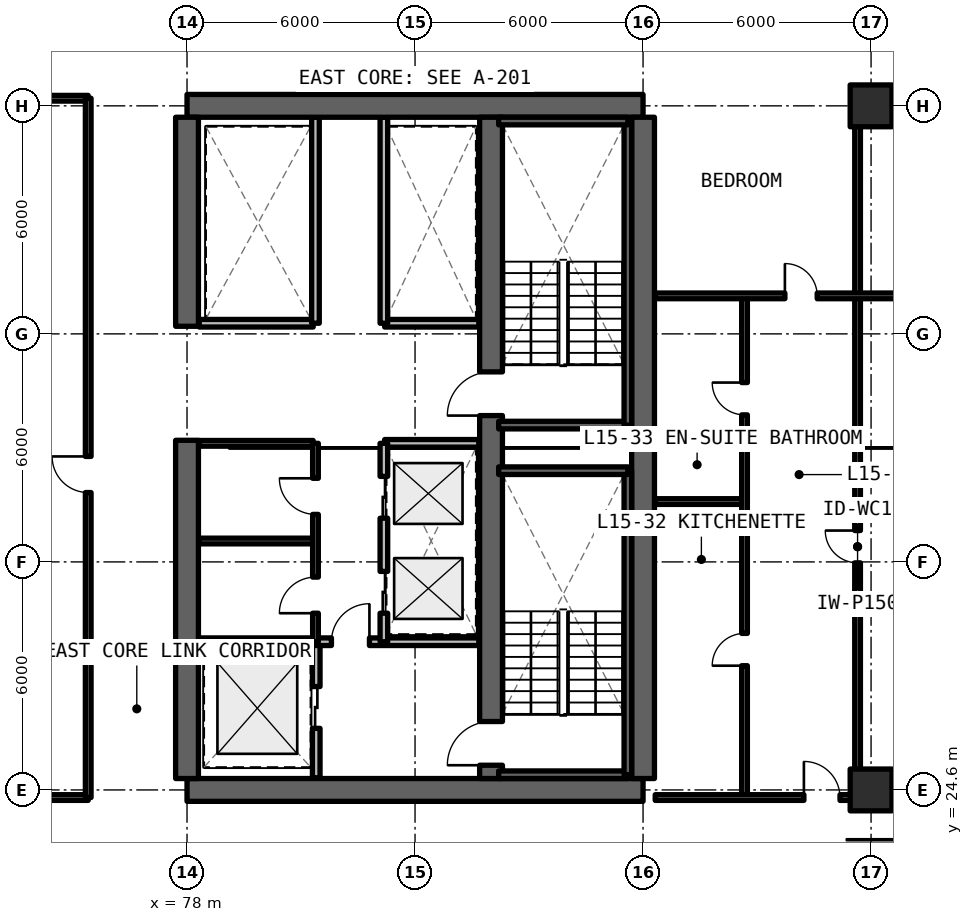
"""IFC4 building model, lengths in metres.
Left out: names, types, materials, properties, quantities, classifications, styles, units other than length and angle.
Written with IfcOpenShell. Run it as: python <this file> out.ifc"""

import sys

from ifc_helpers import new_model, si_unit, direction, frame, frame_2d, origin, origin_2d, place, context, subcontext, project, spatial, rectangle, extrude, element, fill, save


model = new_model("IFC4")
c1 = context("Model", 3, precision=1e-05, world=origin(), true_north=direction((0.0, 1.0)))
c2 = subcontext(c1, "Body", "Model", "MODEL_VIEW")
j1 = project(units=[si_unit("LENGTHUNIT", "METRE"), si_unit("PLANEANGLEUNIT", "RADIAN")], contexts=[c1])
p1 = place(None, origin())
s1 = spatial("IfcSite", under=j1, at=p1, CompositionType="ELEMENT")
p2 = place(p1, origin())
s2 = spatial("IfcBuilding", under=s1, at=p2, CompositionType="ELEMENT")
p3 = place(p2, frame((0.0, 0.0, 55.44)))
s3 = spatial("IfcBuildingStorey", under=s2, at=p3, CompositionType="ELEMENT", Elevation=55.44)
for number, where, z_axis, x_axis in (
    (1, (78.0, 24.6, 0.0), (0.0, 0.0, 1.0), (1.0, 0.0, 0.0)),
    (2, (90.0, 42.6, 0.0), (0.0, 0.0, 1.0), (-1.0, 0.0, 0.0)),
):
    element("IfcWall", number, at=place(p3, frame(where, z_axis=z_axis, x_axis=x_axis)), inside=s3, PredefinedType="SHEAR", context=c2, shape_type="SweptSolid", body=[
        extrude(rectangle(XDim=12.0, YDim=0.6, at=frame_2d((6.0, 0.0))), origin(), (0.0, 0.0, 1.0), 3.3),
    ])
p4 = place(p3, frame((90.0, 24.9, 0.0), z_axis=(0.0, 0.0, 1.0), x_axis=(0.0, 1.0, 0.0)))
e3 = element("IfcWall", 3, at=p4, inside=s3, PredefinedType="SHEAR", context=c2, shape_type="SweptSolid", body=[
    extrude(rectangle(XDim=17.4, YDim=0.6, at=frame_2d((8.7, 0.0))), origin(), (0.0, 0.0, 1.0), 3.3),
])
p5 = place(p3, frame((78.0, 24.9, 0.0), z_axis=(0.0, 0.0, 1.0), x_axis=(0.0, 1.0, 0.0)))
e4 = element("IfcWall", 4, at=p5, inside=s3, PredefinedType="SHEAR", context=c2, shape_type="SweptSolid", body=[
    extrude(rectangle(XDim=8.9, YDim=0.6, at=frame_2d((4.45, 0.0))), origin(), (0.0, 0.0, 1.0), 3.3),
])
p6 = place(p3, frame((78.0, 36.8, 0.0), z_axis=(0.0, 0.0, 1.0), x_axis=(0.0, 1.0, 0.0)))
e5 = element("IfcWall", 5, at=p6, inside=s3, PredefinedType="SHEAR", context=c2, shape_type="SweptSolid", body=[
    extrude(rectangle(XDim=5.5, YDim=0.6, at=frame_2d((2.75, 0.0))), origin(), (0.0, 0.0, 1.0), 3.3),
])
p7 = place(p3, frame((86.0, 24.9, 0.0), z_axis=(0.0, 0.0, 1.0), x_axis=(0.0, 1.0, 0.0)))
e6 = element("IfcWall", 6, at=p7, inside=s3, PredefinedType="SHEAR", context=c2, shape_type="SweptSolid", body=[
    extrude(rectangle(XDim=17.4, YDim=0.6, at=frame_2d((8.7, 0.0))), origin(), (0.0, 0.0, 1.0), 3.3),
])
p8 = place(p7, frame((0.35, 0.0, 0.0)))
e7 = element("IfcOpeningElement", 7, at=p8, cuts=e6, PredefinedType="OPENING", context=c2, shape_type="SweptSolid", body=[
    extrude(rectangle(XDim=1.15, YDim=2.15, at=frame_2d((0.575, 1.075))), frame((0.0, 0.31, 0.0), z_axis=(0.0, -1.0, 0.0), x_axis=(1.0, 0.0, 0.0)), (0.0, 0.0, 1.0), 0.62),
])
p9 = place(p7, frame((9.55, 0.0, 0.0)))
e8 = element("IfcOpeningElement", 8, at=p9, cuts=e6, PredefinedType="OPENING", context=c2, shape_type="SweptSolid", body=[
    extrude(rectangle(XDim=1.15, YDim=2.15, at=frame_2d((0.575, 1.075))), frame((0.0, 0.31, 0.0), z_axis=(0.0, -1.0, 0.0), x_axis=(1.0, 0.0, 0.0)), (0.0, 0.0, 1.0), 0.62),
])
for number, where, z_axis, x_axis in (
    (9, (96.0, 24.6, 0.0), (0.0, 0.0, 1.0), (1.0, 0.0, 0.0)),
    (10, (96.0, 42.6, 0.0), (0.0, 0.0, 1.0), (1.0, 0.0, 0.0)),
):
    element("IfcColumn", number, at=place(p3, frame(where, z_axis=z_axis, x_axis=x_axis)), inside=s3, PredefinedType="COLUMN", context=c2, shape_type="SweptSolid", body=[
        extrude(rectangle(XDim=1.1, YDim=1.1, at=origin_2d()), origin(), (0.0, 0.0, 1.0), 3.3),
    ])
p10 = place(p3, frame((81.4, 24.92, 0.0), z_axis=(0.0, 0.0, 1.0), x_axis=(0.0, 1.0, 0.0)))
e11 = element("IfcWall", 11, at=p10, inside=s3, PredefinedType="SOLIDWALL", context=c2, shape_type="SweptSolid", body=[
    extrude(rectangle(XDim=3.58, YDim=0.2, at=frame_2d((1.79, 0.0))), origin(), (0.0, 0.0, 1.0), 2.35),
])
p11 = place(p10, frame((1.3, 0.0, 0.0)))
e12 = element("IfcOpeningElement", 12, at=p11, cuts=e11, PredefinedType="OPENING", context=c2, shape_type="SweptSolid", body=[
    extrude(rectangle(XDim=1.1, YDim=2.2, at=frame_2d((0.55, 1.1))), frame((0.0, 0.11, 0.0), z_axis=(0.0, -1.0, 0.0), x_axis=(1.0, 0.0, 0.0)), (0.0, 0.0, 1.0), 0.22),
])
p12 = place(p3, frame((78.32, 28.5, 0.0), z_axis=(0.0, 0.0, 1.0), x_axis=(1.0, 0.0, 0.0)))
e13 = element("IfcWall", 13, at=p12, inside=s3, PredefinedType="SOLIDWALL", context=c2, shape_type="SweptSolid", body=[
    extrude(rectangle(XDim=7.36, YDim=0.2, at=frame_2d((3.68, 0.0))), origin(), (0.0, 0.0, 1.0), 2.35),
])
p13 = place(p12, frame((3.48, 0.0, 0.0)))
e14 = element("IfcOpeningElement", 14, at=p13, cuts=e13, PredefinedType="OPENING", context=c2, shape_type="SweptSolid", body=[
    extrude(rectangle(XDim=1.0, YDim=2.15, at=frame_2d((0.5, 1.075))), frame((0.0, 0.11, 0.0), z_axis=(0.0, -1.0, 0.0), x_axis=(1.0, 0.0, 0.0)), (0.0, 0.0, 1.0), 0.22),
])
p14 = place(p3, frame((83.2, 33.72, 0.0), z_axis=(0.0, 0.0, 1.0), x_axis=(1.0, 0.0, 0.0)))
e15 = element("IfcWall", 15, at=p14, inside=s3, PredefinedType="SOLIDWALL", context=c2, shape_type="SweptSolid", body=[
    extrude(rectangle(XDim=2.48, YDim=0.2, at=frame_2d((1.24, 0.0))), origin(), (0.0, 0.0, 1.0), 2.35),
])
p15 = place(p3, frame((83.18, 28.5, 0.0), z_axis=(0.0, 0.0, 1.0), x_axis=(0.0, 1.0, 0.0)))
e16 = element("IfcWall", 16, at=p15, inside=s3, PredefinedType="SOLIDWALL", context=c2, shape_type="SweptSolid", body=[
    extrude(rectangle(XDim=5.22, YDim=0.2, at=frame_2d((2.61, 0.0))), origin(), (0.0, 0.0, 1.0), 2.35),
])
p16 = place(p15, frame((0.75, 0.0, 0.0)))
e17 = element("IfcOpeningElement", 17, at=p16, cuts=e16, PredefinedType="OPENING", context=c2, shape_type="SweptSolid", body=[
    extrude(rectangle(XDim=1.1, YDim=2.2, at=frame_2d((0.55, 1.1))), frame((0.0, 0.11, 0.0), z_axis=(0.0, -1.0, 0.0), x_axis=(1.0, 0.0, 0.0)), (0.0, 0.0, 1.0), 0.22),
])
p17 = place(p15, frame((3.25, 0.0, 0.0)))
e18 = element("IfcOpeningElement", 18, at=p17, cuts=e16, PredefinedType="OPENING", context=c2, shape_type="SweptSolid", body=[
    extrude(rectangle(XDim=1.1, YDim=2.2, at=frame_2d((0.55, 1.1))), frame((0.0, 0.11, 0.0), z_axis=(0.0, -1.0, 0.0), x_axis=(1.0, 0.0, 0.0)), (0.0, 0.0, 1.0), 0.22),
])
for number, where, z_axis, x_axis in (
    (19, (78.32, 31.15, 0.0), (0.0, 0.0, 1.0), (1.0, 0.0, 0.0)),
    (20, (78.32, 33.72, 0.0), (0.0, 0.0, 1.0), (1.0, 0.0, 0.0)),
):
    element("IfcWall", number, at=place(p3, frame(where, z_axis=z_axis, x_axis=x_axis)), inside=s3, PredefinedType="SOLIDWALL", context=c2, shape_type="SweptSolid", body=[
        extrude(rectangle(XDim=3.0, YDim=0.15, at=frame_2d((1.5, 0.0))), origin(), (0.0, 0.0, 1.0), 2.35),
    ])
p18 = place(p3, frame((81.38, 28.5, 0.0), z_axis=(0.0, 0.0, 1.0), x_axis=(0.0, 1.0, 0.0)))
e21 = element("IfcWall", 21, at=p18, inside=s3, PredefinedType="SOLIDWALL", context=c2, shape_type="SweptSolid", body=[
    extrude(rectangle(XDim=5.22, YDim=0.15, at=frame_2d((2.61, 0.0))), origin(), (0.0, 0.0, 1.0), 2.35),
])
p19 = place(p18, frame((0.75, 0.0, 0.0)))
e22 = element("IfcOpeningElement", 22, at=p19, cuts=e21, PredefinedType="OPENING", context=c2, shape_type="SweptSolid", body=[
    extrude(rectangle(XDim=0.95, YDim=2.15, at=frame_2d((0.475, 1.075))), frame((0.0, 0.085, 0.0), z_axis=(0.0, -1.0, 0.0), x_axis=(1.0, 0.0, 0.0)), (0.0, 0.0, 1.0), 0.17),
])
p20 = place(p18, frame((3.35, 0.0, 0.0)))
e23 = element("IfcOpeningElement", 23, at=p20, cuts=e21, PredefinedType="OPENING", context=c2, shape_type="SweptSolid", body=[
    extrude(rectangle(XDim=0.95, YDim=2.15, at=frame_2d((0.475, 1.075))), frame((0.0, 0.085, 0.0), z_axis=(0.0, -1.0, 0.0), x_axis=(1.0, 0.0, 0.0)), (0.0, 0.0, 1.0), 0.17),
])
p21 = place(p3, frame((83.2, 36.88, 0.0), z_axis=(0.0, 0.0, 1.0), x_axis=(1.0, 0.0, 0.0)))
e24 = element("IfcWall", 24, at=p21, inside=s3, PredefinedType="SOLIDWALL", context=c2, shape_type="SweptSolid", body=[
    extrude(rectangle(XDim=2.48, YDim=0.2, at=frame_2d((1.24, 0.0))), origin(), (0.0, 0.0, 1.0), 2.35),
])
p22 = place(p3, frame((83.18, 36.88, 0.0), z_axis=(0.0, 0.0, 1.0), x_axis=(0.0, 1.0, 0.0)))
e25 = element("IfcWall", 25, at=p22, inside=s3, PredefinedType="SOLIDWALL", context=c2, shape_type="SweptSolid", body=[
    extrude(rectangle(XDim=5.42, YDim=0.2, at=frame_2d((2.71, 0.0))), origin(), (0.0, 0.0, 1.0), 2.35),
])
p23 = place(p3, frame((78.32, 36.88, 0.0), z_axis=(0.0, 0.0, 1.0), x_axis=(1.0, 0.0, 0.0)))
e26 = element("IfcWall", 26, at=p23, inside=s3, PredefinedType="SOLIDWALL", context=c2, shape_type="SweptSolid", body=[
    extrude(rectangle(XDim=3.0, YDim=0.2, at=frame_2d((1.5, 0.0))), origin(), (0.0, 0.0, 1.0), 2.35),
])
p24 = place(p3, frame((81.38, 36.88, 0.0), z_axis=(0.0, 0.0, 1.0), x_axis=(0.0, 1.0, 0.0)))
e27 = element("IfcWall", 27, at=p24, inside=s3, PredefinedType="SOLIDWALL", context=c2, shape_type="SweptSolid", body=[
    extrude(rectangle(XDim=5.42, YDim=0.2, at=frame_2d((2.71, 0.0))), origin(), (0.0, 0.0, 1.0), 2.35),
])
for number, where, z_axis, x_axis in (
    (28, (67.15, 24.4, 0.0), (0.0, 0.0, 1.0), (1.0, 0.0, 0.0)),
    (29, (67.15, 42.8, 0.0), (0.0, 0.0, 1.0), (1.0, 0.0, 0.0)),
):
    element("IfcWall", number, at=place(p3, frame(where, z_axis=z_axis, x_axis=x_axis)), inside=s3, PredefinedType="SOLIDWALL", context=c2, shape_type="SweptSolid", body=[
        extrude(rectangle(XDim=8.25, YDim=0.15, at=frame_2d((4.125, 0.0))), origin(), (0.0, 0.0, 1.0), 2.295),
    ])
p25 = place(p3, frame((75.4, 24.4, 0.0), z_axis=(0.0, 0.0, 1.0), x_axis=(0.0, 1.0, 0.0)))
e30 = element("IfcWall", 30, at=p25, inside=s3, PredefinedType="SOLIDWALL", context=c2, shape_type="SweptSolid", body=[
    extrude(rectangle(XDim=18.4, YDim=0.15, at=frame_2d((9.2, 0.0))), origin(), (0.0, 0.0, 1.0), 2.35),
])
p26 = place(p25, frame((8.025, 0.0, 0.0)))
e31 = element("IfcOpeningElement", 31, at=p26, cuts=e30, PredefinedType="OPENING", context=c2, shape_type="SweptSolid", body=[
    extrude(rectangle(XDim=0.95, YDim=2.15, at=frame_2d((0.475, 1.075))), frame((0.0, 0.085, 0.0), z_axis=(0.0, -1.0, 0.0), x_axis=(1.0, 0.0, 0.0)), (0.0, 0.0, 1.0), 0.17),
])
p27 = place(p3, frame((95.645, 24.4, 0.0), z_axis=(0.0, 0.0, 1.0), x_axis=(0.0, 1.0, 0.0)))
e32 = element("IfcWall", 32, at=p27, inside=s3, PredefinedType="PARTITIONING", context=c2, shape_type="SweptSolid", body=[
    extrude(rectangle(XDim=13.2, YDim=0.15, at=frame_2d((6.6, 0.0))), origin(), (0.0, 0.0, 1.0), 2.35),
])
p28 = place(p27, frame((6.175, 0.0, 0.0)))
e33 = element("IfcOpeningElement", 33, at=p28, cuts=e32, PredefinedType="OPENING", context=c2, shape_type="SweptSolid", body=[
    extrude(rectangle(XDim=0.85, YDim=2.1, at=frame_2d((0.425, 1.05))), frame((0.0, 0.085, 0.0), z_axis=(0.0, -1.0, 0.0), x_axis=(1.0, 0.0, 0.0)), (0.0, 0.0, 1.0), 0.17),
])
p29 = place(p3, frame((90.32, 32.188, 0.0), z_axis=(0.0, 0.0, 1.0), x_axis=(1.0, 0.0, 0.0)))
e34 = element("IfcWall", 34, at=p29, inside=s3, PredefinedType="PARTITIONING", context=c2, shape_type="SweptSolid", body=[
    extrude(rectangle(XDim=2.35, YDim=0.15, at=frame_2d((1.175, 0.0))), origin(), (0.0, 0.0, 1.0), 2.35),
])
p30 = place(p3, frame((92.67, 24.4, 0.0), z_axis=(0.0, 0.0, 1.0), x_axis=(0.0, 1.0, 0.0)))
e35 = element("IfcWall", 35, at=p30, inside=s3, PredefinedType="PARTITIONING", context=c2, shape_type="SweptSolid", body=[
    extrude(rectangle(XDim=13.2, YDim=0.15, at=frame_2d((6.6, 0.0))), origin(), (0.0, 0.0, 1.0), 2.35),
])
p31 = place(p30, frame((3.469, 0.0, 0.0)))
e36 = element("IfcOpeningElement", 36, at=p31, cuts=e35, PredefinedType="OPENING", context=c2, shape_type="SweptSolid", body=[
    extrude(rectangle(XDim=0.85, YDim=2.1, at=frame_2d((0.425, 1.05))), frame((0.0, 0.085, 0.0), z_axis=(0.0, -1.0, 0.0), x_axis=(1.0, 0.0, 0.0)), (0.0, 0.0, 1.0), 0.17),
])
p32 = place(p30, frame((10.069, 0.0, 0.0)))
e37 = element("IfcOpeningElement", 37, at=p32, cuts=e35, PredefinedType="OPENING", context=c2, shape_type="SweptSolid", body=[
    extrude(rectangle(XDim=0.85, YDim=2.1, at=frame_2d((0.425, 1.05))), frame((0.0, 0.085, 0.0), z_axis=(0.0, -1.0, 0.0), x_axis=(1.0, 0.0, 0.0)), (0.0, 0.0, 1.0), 0.17),
])
p33 = place(p3, frame((95.645, 37.6, 0.0), z_axis=(0.0, 0.0, 1.0), x_axis=(0.0, 1.0, 0.0)))
e38 = element("IfcWall", 38, at=p33, inside=s3, PredefinedType="PARTITIONING", context=c2, shape_type="SweptSolid", body=[
    extrude(rectangle(XDim=5.2, YDim=0.15, at=frame_2d((2.6, 0.0))), origin(), (0.0, 0.0, 1.0), 2.35),
])
p34 = place(p3, frame((90.32, 37.6, 0.0), z_axis=(0.0, 0.0, 1.0), x_axis=(1.0, 0.0, 0.0)))
e39 = element("IfcWall", 39, at=p34, inside=s3, PredefinedType="PARTITIONING", context=c2, shape_type="SweptSolid", body=[
    extrude(rectangle(XDim=10.24, YDim=0.15, at=frame_2d((5.12, 0.0))), origin(), (0.0, 0.0, 1.0), 2.35),
])
p35 = place(p34, frame((3.412, 0.0, 0.0)))
e40 = element("IfcOpeningElement", 40, at=p35, cuts=e39, PredefinedType="OPENING", context=c2, shape_type="SweptSolid", body=[
    extrude(rectangle(XDim=0.85, YDim=2.1, at=frame_2d((0.425, 1.05))), frame((0.0, 0.085, 0.0), z_axis=(0.0, -1.0, 0.0), x_axis=(1.0, 0.0, 0.0)), (0.0, 0.0, 1.0), 0.17),
])
p36 = place(p34, frame((7.357, 0.0, 0.0)))
e41 = element("IfcOpeningElement", 41, at=p36, cuts=e39, PredefinedType="OPENING", context=c2, shape_type="SweptSolid", body=[
    extrude(rectangle(XDim=0.85, YDim=2.1, at=frame_2d((0.425, 1.05))), frame((0.0, 0.085, 0.0), z_axis=(0.0, -1.0, 0.0), x_axis=(1.0, 0.0, 0.0)), (0.0, 0.0, 1.0), 0.17),
])
p37 = place(p3, frame((90.32, 24.4, 0.0), z_axis=(0.0, 0.0, 1.0), x_axis=(1.0, 0.0, 0.0)))
e42 = element("IfcWall", 42, at=p37, inside=s3, PredefinedType="SOLIDWALL", context=c2, shape_type="SweptSolid", body=[
    extrude(rectangle(XDim=10.24, YDim=0.15, at=frame_2d((5.12, 0.0))), origin(), (0.0, 0.0, 1.0), 2.295),
])
p38 = place(p37, frame((3.913, 0.0, 0.0)))
e43 = element("IfcOpeningElement", 43, at=p38, cuts=e42, PredefinedType="OPENING", context=c2, shape_type="SweptSolid", body=[
    extrude(rectangle(XDim=0.95, YDim=2.15, at=frame_2d((0.475, 1.075))), frame((0.0, 0.085, 0.0), z_axis=(0.0, -1.0, 0.0), x_axis=(1.0, 0.0, 0.0)), (0.0, 0.0, 1.0), 0.17),
])
p39 = place(p3, frame((86.2, 25.0, 0.0), z_axis=(0.0, 0.0, 1.0), x_axis=(1.0, 0.0, 0.0)))
e44 = element("IfcWall", 44, at=p39, inside=s3, PredefinedType="SOLIDWALL", context=c2, shape_type="SweptSolid", body=[
    extrude(rectangle(XDim=3.4, YDim=0.2, at=frame_2d((1.7, 0.0))), origin(), (0.0, 0.0, 1.0), 3.3),
])
p40 = place(p3, frame((89.6, 25.0, 0.0), z_axis=(0.0, 0.0, 1.0), x_axis=(0.0, 1.0, 0.0)))
e45 = element("IfcWall", 45, at=p40, inside=s3, PredefinedType="SOLIDWALL", context=c2, shape_type="SweptSolid", body=[
    extrude(rectangle(XDim=8.0, YDim=0.2, at=frame_2d((4.0, 0.0))), origin(), (0.0, 0.0, 1.0), 3.3),
])
for number, where, z_axis, x_axis in (
    (46, (89.6, 33.0, 0.0), (0.0, 0.0, 1.0), (-1.0, 0.0, 0.0)),
    (47, (86.2, 34.2, 0.0), (0.0, 0.0, 1.0), (1.0, 0.0, 0.0)),
):
    element("IfcWall", number, at=place(p3, frame(where, z_axis=z_axis, x_axis=x_axis)), inside=s3, PredefinedType="SOLIDWALL", context=c2, shape_type="SweptSolid", body=[
        extrude(rectangle(XDim=3.4, YDim=0.2, at=frame_2d((1.7, 0.0))), origin(), (0.0, 0.0, 1.0), 3.3),
    ])
p41 = place(p3, frame((89.6, 34.2, 0.0), z_axis=(0.0, 0.0, 1.0), x_axis=(0.0, 1.0, 0.0)))
e48 = element("IfcWall", 48, at=p41, inside=s3, PredefinedType="SOLIDWALL", context=c2, shape_type="SweptSolid", body=[
    extrude(rectangle(XDim=8.0, YDim=0.2, at=frame_2d((4.0, 0.0))), origin(), (0.0, 0.0, 1.0), 3.3),
])
p42 = place(p3, frame((89.6, 42.2, 0.0), z_axis=(0.0, 0.0, 1.0), x_axis=(-1.0, 0.0, 0.0)))
e49 = element("IfcWall", 49, at=p42, inside=s3, PredefinedType="SOLIDWALL", context=c2, shape_type="SweptSolid", body=[
    extrude(rectangle(XDim=3.4, YDim=0.2, at=frame_2d((1.7, 0.0))), origin(), (0.0, 0.0, 1.0), 3.3),
])
p43 = place(p11, origin())
e50 = element("IfcDoor", 50, at=p43, inside=s3, OperationType="SLIDING_TO_LEFT", PredefinedType="DOOR", context=c2, shape_type="SweptSolid", body=[
    extrude(rectangle(XDim=1.1, YDim=2.2, at=frame_2d((0.55, 1.1))), frame((0.0, 0.025, 0.0), z_axis=(0.0, -1.0, 0.0), x_axis=(1.0, 0.0, 0.0)), (0.0, 0.0, 1.0), 0.05),
])
fill(e12, e50)
p44 = place(p13, origin())
e51 = element("IfcDoor", 51, at=p44, inside=s3, OperationType="SINGLE_SWING_RIGHT", PredefinedType="DOOR", context=c2, shape_type="SweptSolid", body=[
    extrude(rectangle(XDim=1.0, YDim=2.15, at=frame_2d((0.5, 1.075))), frame((0.0, 0.025, 0.0), z_axis=(0.0, -1.0, 0.0), x_axis=(1.0, 0.0, 0.0)), (0.0, 0.0, 1.0), 0.05),
])
fill(e14, e51)
p45 = place(p16, origin())
e52 = element("IfcDoor", 52, at=p45, inside=s3, OperationType="SLIDING_TO_LEFT", PredefinedType="DOOR", context=c2, shape_type="SweptSolid", body=[
    extrude(rectangle(XDim=1.1, YDim=2.2, at=frame_2d((0.55, 1.1))), frame((0.0, 0.025, 0.0), z_axis=(0.0, -1.0, 0.0), x_axis=(1.0, 0.0, 0.0)), (0.0, 0.0, 1.0), 0.05),
])
fill(e17, e52)
p46 = place(p17, origin())
e53 = element("IfcDoor", 53, at=p46, inside=s3, OperationType="SLIDING_TO_RIGHT", PredefinedType="DOOR", context=c2, shape_type="SweptSolid", body=[
    extrude(rectangle(XDim=1.1, YDim=2.2, at=frame_2d((0.55, 1.1))), frame((0.0, 0.025, 0.0), z_axis=(0.0, -1.0, 0.0), x_axis=(1.0, 0.0, 0.0)), (0.0, 0.0, 1.0), 0.05),
])
fill(e18, e53)
p47 = place(p19, origin())
e54 = element("IfcDoor", 54, at=p47, inside=s3, OperationType="SINGLE_SWING_LEFT", PredefinedType="DOOR", context=c2, shape_type="SweptSolid", body=[
    extrude(rectangle(XDim=0.95, YDim=2.15, at=frame_2d((0.475, 1.075))), frame((0.0, 0.025, 0.0), z_axis=(0.0, -1.0, 0.0), x_axis=(1.0, 0.0, 0.0)), (0.0, 0.0, 1.0), 0.05),
])
fill(e22, e54)
p48 = place(p20, origin())
e55 = element("IfcDoor", 55, at=p48, inside=s3, OperationType="SINGLE_SWING_RIGHT", PredefinedType="DOOR", context=c2, shape_type="SweptSolid", body=[
    extrude(rectangle(XDim=0.95, YDim=2.15, at=frame_2d((0.475, 1.075))), frame((0.0, 0.025, 0.0), z_axis=(0.0, -1.0, 0.0), x_axis=(1.0, 0.0, 0.0)), (0.0, 0.0, 1.0), 0.05),
])
fill(e23, e55)
p49 = place(p26, origin())
e56 = element("IfcDoor", 56, at=p49, inside=s3, OperationType="SINGLE_SWING_RIGHT", PredefinedType="DOOR", context=c2, shape_type="SweptSolid", body=[
    extrude(rectangle(XDim=0.95, YDim=2.15, at=frame_2d((0.475, 1.075))), frame((0.0, 0.025, 0.0), z_axis=(0.0, -1.0, 0.0), x_axis=(1.0, 0.0, 0.0)), (0.0, 0.0, 1.0), 0.05),
])
fill(e31, e56)
p50 = place(p28, origin())
e57 = element("IfcDoor", 57, at=p50, inside=s3, OperationType="SINGLE_SWING_RIGHT", PredefinedType="DOOR", context=c2, shape_type="SweptSolid", body=[
    extrude(rectangle(XDim=0.85, YDim=2.1, at=frame_2d((0.425, 1.05))), frame((0.0, 0.025, 0.0), z_axis=(0.0, -1.0, 0.0), x_axis=(1.0, 0.0, 0.0)), (0.0, 0.0, 1.0), 0.05),
])
fill(e33, e57)
p51 = place(p31, origin())
e58 = element("IfcDoor", 58, at=p51, inside=s3, OperationType="SINGLE_SWING_LEFT", PredefinedType="DOOR", context=c2, shape_type="SweptSolid", body=[
    extrude(rectangle(XDim=0.85, YDim=2.1, at=frame_2d((0.425, 1.05))), frame((0.0, 0.025, 0.0), z_axis=(0.0, -1.0, 0.0), x_axis=(1.0, 0.0, 0.0)), (0.0, 0.0, 1.0), 0.05),
])
fill(e36, e58)
p52 = place(p32, origin())
e59 = element("IfcDoor", 59, at=p52, inside=s3, OperationType="SINGLE_SWING_RIGHT", PredefinedType="DOOR", context=c2, shape_type="SweptSolid", body=[
    extrude(rectangle(XDim=0.85, YDim=2.1, at=frame_2d((0.425, 1.05))), frame((0.0, 0.025, 0.0), z_axis=(0.0, -1.0, 0.0), x_axis=(1.0, 0.0, 0.0)), (0.0, 0.0, 1.0), 0.05),
])
fill(e37, e59)
p53 = place(p35, origin())
e60 = element("IfcDoor", 60, at=p53, inside=s3, OperationType="SINGLE_SWING_LEFT", PredefinedType="DOOR", context=c2, shape_type="SweptSolid", body=[
    extrude(rectangle(XDim=0.85, YDim=2.1, at=frame_2d((0.425, 1.05))), frame((0.0, 0.025, 0.0), z_axis=(0.0, -1.0, 0.0), x_axis=(1.0, 0.0, 0.0)), (0.0, 0.0, 1.0), 0.05),
])
fill(e40, e60)
p54 = place(p38, origin())
e61 = element("IfcDoor", 61, at=p54, inside=s3, OperationType="SINGLE_SWING_LEFT", PredefinedType="DOOR", context=c2, shape_type="SweptSolid", body=[
    extrude(rectangle(XDim=0.95, YDim=2.15, at=frame_2d((0.475, 1.075))), frame((0.0, 0.025, 0.0), z_axis=(0.0, -1.0, 0.0), x_axis=(1.0, 0.0, 0.0)), (0.0, 0.0, 1.0), 0.05),
])
fill(e43, e61)
p55 = place(p8, origin())
e62 = element("IfcDoor", 62, at=p55, inside=s3, OperationType="SINGLE_SWING_RIGHT", PredefinedType="DOOR", context=c2, shape_type="SweptSolid", body=[
    extrude(rectangle(XDim=1.15, YDim=2.15, at=frame_2d((0.575, 1.075))), frame((0.0, 0.025, 0.0), z_axis=(0.0, -1.0, 0.0), x_axis=(1.0, 0.0, 0.0)), (0.0, 0.0, 1.0), 0.05),
])
fill(e7, e62)
p56 = place(p9, origin())
e63 = element("IfcDoor", 63, at=p56, inside=s3, OperationType="SINGLE_SWING_LEFT", PredefinedType="DOOR", context=c2, shape_type="SweptSolid", body=[
    extrude(rectangle(XDim=1.15, YDim=2.15, at=frame_2d((0.575, 1.075))), frame((0.0, 0.025, 0.0), z_axis=(0.0, -1.0, 0.0), x_axis=(1.0, 0.0, 0.0)), (0.0, 0.0, 1.0), 0.05),
])
fill(e8, e63)
save(model, sys.argv[1])
